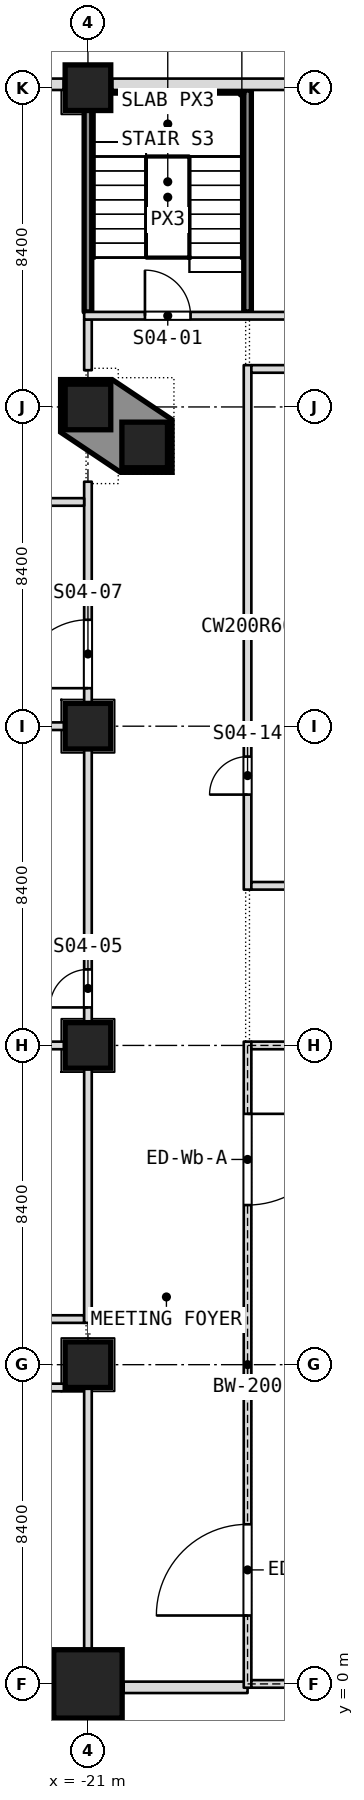
"""IFC4 building model, lengths in metres.
Left out: names, types, materials, properties, quantities, classifications, styles, units other than length and angle.
Written with IfcOpenShell. Run it as: python <this file> out.ifc"""

import sys

from ifc_helpers import new_model, si_unit, direction, frame, frame_2d, origin, origin_2d, place, context, subcontext, project, spatial, polyline, rectangle, outline, extrude, element, fill, save


model = new_model("IFC4")
c1 = context("Model", 3, precision=1e-05, world=origin(), true_north=direction((0.0, 1.0)))
c2 = subcontext(c1, "Body", "Model", "MODEL_VIEW")
j1 = project(units=[si_unit("LENGTHUNIT", "METRE"), si_unit("PLANEANGLEUNIT", "RADIAN")], contexts=[c1])
p1 = place(None, origin())
s1 = spatial("IfcSite", under=j1, at=p1, CompositionType="ELEMENT")
p2 = place(p1, origin())
s2 = spatial("IfcBuilding", under=s1, at=p2, CompositionType="ELEMENT")
p3 = place(p2, frame((0.0, 0.0, 21.0)))
s3 = spatial("IfcBuildingStorey", under=s2, at=p3, CompositionType="ELEMENT", Elevation=21.0)
p4 = place(p3, frame((-21.0, 0.0, 0.0), z_axis=(0.0, 0.0, 1.0), x_axis=(1.0, 0.0, 0.0)))
e1 = element("IfcColumn", 1, at=p4, inside=s3, PredefinedType="COLUMN", context=c2, shape_type="SweptSolid", body=[
    extrude(rectangle(XDim=1.8, YDim=1.8, at=origin_2d()), origin(), (0.0, 0.0, 1.0), 5.0),
])
for number, where, z_axis, x_axis in (
    (2, (-21.0, 8.4, 0.0), (0.0, 0.0, 1.0), (1.0, 0.0, 0.0)),
    (3, (-21.0, 16.8, 0.0), (0.0, 0.0, 1.0), (1.0, 0.0, 0.0)),
    (4, (-21.0, 25.2, 0.0), (0.0, 0.0, 1.0), (1.0, 0.0, 0.0)),
    (5, (-21.0, 33.6, 0.0), (0.0, 0.0, 1.0), (1.0, 0.0, 0.0)),
    (6, (-21.0, 42.0, 0.0), (0.0, 0.0, 1.0), (1.0, 0.0, 0.0)),
    (7, (-19.507, 32.6, 0.0), (0.0, 0.0, 1.0), (1.0, 0.0, 0.0)),
):
    element("IfcColumn", number, at=place(p3, frame(where, z_axis=z_axis, x_axis=x_axis)), inside=s3, PredefinedType="COLUMN", context=c2, shape_type="SweptSolid", body=[
        extrude(rectangle(XDim=1.2, YDim=1.2, at=origin_2d()), origin(), (0.0, 0.0, 1.0), 5.0),
    ])
p5 = place(p3, frame((-37.74, 7.8, 0.0), z_axis=(0.0, 0.0, 1.0), x_axis=(1.0, 0.0, 0.0)))
e8 = element("IfcWall", 8, at=p5, inside=s3, PredefinedType="PARTITIONING", context=c2, shape_type="SweptSolid", body=[
    extrude(rectangle(XDim=16.64, YDim=0.2, at=frame_2d((8.32, 0.0))), origin(), (0.0, 0.0, 1.0), 4.68),
])
p6 = place(p5, frame((6.14, 0.0, 0.0)))
e9 = element("IfcOpeningElement", 9, at=p6, cuts=e8, PredefinedType="OPENING", context=c2, shape_type="SweptSolid", body=[
    extrude(rectangle(XDim=1.8, YDim=2.1, at=frame_2d((0.9, 1.05))), frame((0.0, 0.1, 0.0), z_axis=(0.0, -1.0, 0.0), x_axis=(1.0, 0.0, 0.0)), (0.0, 0.0, 1.0), 0.2),
])
p7 = place(p3, frame((-27.5, 9.6, 0.0), z_axis=(0.0, 0.0, 1.0), x_axis=(1.0, 0.0, 0.0)))
e10 = element("IfcWall", 10, at=p7, inside=s3, PredefinedType="PARTITIONING", context=c2, shape_type="SweptSolid", body=[
    extrude(rectangle(XDim=6.4, YDim=0.2, at=frame_2d((3.2, 0.0))), origin(), (0.0, 0.0, 1.0), 4.68),
])
p8 = place(p3, frame((-16.8, 20.9, 0.0), z_axis=(0.0, 0.0, 1.0), x_axis=(0.0, 1.0, 0.0)))
e11 = element("IfcWall", 11, at=p8, inside=s3, PredefinedType="PARTITIONING", context=c2, shape_type="SweptSolid", body=[
    extrude(rectangle(XDim=13.8, YDim=0.2, at=frame_2d((6.9, 0.0))), origin(), (0.0, 0.0, 1.0), 4.68),
])
p9 = place(p8, frame((2.5, 0.0, 0.0)))
e12 = element("IfcOpeningElement", 12, at=p9, cuts=e11, PredefinedType="OPENING", context=c2, shape_type="SweptSolid", body=[
    extrude(rectangle(XDim=1.0, YDim=2.1, at=frame_2d((0.5, 1.05))), frame((0.0, 0.1, 0.0), z_axis=(0.0, -1.0, 0.0), x_axis=(1.0, 0.0, 0.0)), (0.0, 0.0, 1.0), 0.2),
])
p10 = place(p3, frame((-16.8, 36.1, 0.0), z_axis=(0.0, 0.0, 1.0), x_axis=(0.0, 1.0, 0.0)))
e13 = element("IfcWall", 13, at=p10, inside=s3, PredefinedType="PARTITIONING", context=c2, shape_type="SweptSolid", body=[
    extrude(rectangle(XDim=5.84, YDim=0.2, at=frame_2d((2.92, 0.0))), origin(), (0.0, 0.0, 1.0), 4.68),
])
p11 = place(p3, frame((-27.63, 16.8, 0.0), z_axis=(0.0, 0.0, 1.0), x_axis=(1.0, 0.0, 0.0)))
e14 = element("IfcWall", 14, at=p11, inside=s3, PredefinedType="PARTITIONING", context=c2, shape_type="SweptSolid", body=[
    extrude(rectangle(XDim=6.53, YDim=0.2, at=frame_2d((3.265, 0.0))), origin(), (0.0, 0.0, 1.0), 4.68),
])
p12 = place(p3, frame((-21.0, -0.3, 0.0), z_axis=(0.0, 0.0, 1.0), x_axis=(0.0, 1.0, 0.0)))
e15 = element("IfcWall", 15, at=p12, inside=s3, PredefinedType="PARTITIONING", context=c2, shape_type="SweptSolid", body=[
    extrude(rectangle(XDim=8.2, YDim=0.2, at=frame_2d((4.1, 0.0))), origin(), (0.0, 0.0, 1.0), 4.68),
])
p13 = place(p3, frame((-21.0, 9.5, 0.0), z_axis=(0.0, 0.0, 1.0), x_axis=(0.0, 1.0, 0.0)))
e16 = element("IfcWall", 16, at=p13, inside=s3, PredefinedType="PARTITIONING", context=c2, shape_type="SweptSolid", body=[
    extrude(rectangle(XDim=22.133, YDim=0.2, at=frame_2d((11.066, 0.0))), origin(), (0.0, 0.0, 1.0), 4.68),
])
p14 = place(p13, frame((8.3, 0.0, 0.0)))
e17 = element("IfcOpeningElement", 17, at=p14, cuts=e16, PredefinedType="OPENING", context=c2, shape_type="SweptSolid", body=[
    extrude(rectangle(XDim=1.0, YDim=2.1, at=frame_2d((0.5, 1.05))), frame((0.0, 0.1, 0.0), z_axis=(0.0, -1.0, 0.0), x_axis=(1.0, 0.0, 0.0)), (0.0, 0.0, 1.0), 0.2),
])
p15 = place(p13, frame((16.7, 0.0, 0.0)))
e18 = element("IfcOpeningElement", 18, at=p15, cuts=e16, PredefinedType="OPENING", context=c2, shape_type="SweptSolid", body=[
    extrude(rectangle(XDim=1.8, YDim=2.1, at=frame_2d((0.9, 1.05))), frame((0.0, 0.1, 0.0), z_axis=(0.0, -1.0, 0.0), x_axis=(1.0, 0.0, 0.0)), (0.0, 0.0, 1.0), 0.2),
])
p16 = place(p3, frame((-21.0, 34.567, 0.0), z_axis=(0.0, 0.0, 1.0), x_axis=(0.0, 1.0, 0.0)))
e19 = element("IfcWall", 19, at=p16, inside=s3, PredefinedType="PARTITIONING", context=c2, shape_type="SweptSolid", body=[
    extrude(rectangle(XDim=1.333, YDim=0.2, at=frame_2d((0.667, 0.0))), origin(), (0.0, 0.0, 1.0), 4.68),
])
p17 = place(p3, frame((-21.0, 36.1, 0.0), z_axis=(0.0, 0.0, 1.0), x_axis=(0.0, 1.0, 0.0)))
e20 = element("IfcWall", 20, at=p17, inside=s3, PredefinedType="PARTITIONING", context=c2, shape_type="SweptSolid", body=[
    extrude(rectangle(XDim=6.2, YDim=0.2, at=frame_2d((3.1, 0.0))), origin(), (0.0, 0.0, 1.0), 4.68),
])
p18 = place(p3, frame((-16.7, 21.0, 0.0), z_axis=(0.0, 0.0, 1.0), x_axis=(1.0, 0.0, 0.0)))
e21 = element("IfcWall", 21, at=p18, inside=s3, PredefinedType="PARTITIONING", context=c2, shape_type="SweptSolid", body=[
    extrude(rectangle(XDim=33.4, YDim=0.2, at=frame_2d((16.7, 0.0))), origin(), (0.0, 0.0, 1.0), 4.68),
])
p19 = place(p18, frame((15.8, 0.0, 0.0)))
e22 = element("IfcOpeningElement", 22, at=p19, cuts=e21, PredefinedType="OPENING", context=c2, shape_type="SweptSolid", body=[
    extrude(rectangle(XDim=1.8, YDim=2.1, at=frame_2d((0.9, 1.05))), frame((0.0, 0.1, 0.0), z_axis=(0.0, -1.0, 0.0), x_axis=(1.0, 0.0, 0.0)), (0.0, 0.0, 1.0), 0.2),
])
p20 = place(p3, frame((-27.68, 25.2, 0.0), z_axis=(0.0, 0.0, 1.0), x_axis=(1.0, 0.0, 0.0)))
e23 = element("IfcWall", 23, at=p20, inside=s3, PredefinedType="PARTITIONING", context=c2, shape_type="SweptSolid", body=[
    extrude(rectangle(XDim=6.58, YDim=0.2, at=frame_2d((3.29, 0.0))), origin(), (0.0, 0.0, 1.0), 4.68),
])
p21 = place(p3, frame((-25.916, 31.1, 0.0), z_axis=(0.0, 0.0, 1.0), x_axis=(1.0, 0.0, 0.0)))
e24 = element("IfcWall", 24, at=p21, inside=s3, PredefinedType="PARTITIONING", context=c2, shape_type="SweptSolid", body=[
    extrude(rectangle(XDim=4.816, YDim=0.2, at=frame_2d((2.408, 0.0))), origin(), (0.0, 0.0, 1.0), 4.68),
])
p22 = place(p3, frame((-16.7, 34.6, 0.0), z_axis=(0.0, 0.0, 1.0), x_axis=(1.0, 0.0, 0.0)))
e25 = element("IfcWall", 25, at=p22, inside=s3, PredefinedType="PARTITIONING", context=c2, shape_type="SweptSolid", body=[
    extrude(rectangle(XDim=3.33, YDim=0.2, at=frame_2d((1.665, 0.0))), origin(), (0.0, 0.0, 1.0), 4.68),
])
p23 = place(p3, frame((-21.1, 36.0, 0.0), z_axis=(0.0, 0.0, 1.0), x_axis=(1.0, 0.0, 0.0)))
e26 = element("IfcWall", 26, at=p23, inside=s3, PredefinedType="PARTITIONING", context=c2, shape_type="SweptSolid", body=[
    extrude(rectangle(XDim=23.3, YDim=0.2, at=frame_2d((11.65, 0.0))), origin(), (0.0, 0.0, 1.0), 4.68),
])
p24 = place(p23, frame((1.6, 0.0, 0.0)))
e27 = element("IfcOpeningElement", 27, at=p24, cuts=e26, PredefinedType="OPENING", context=c2, shape_type="SweptSolid", body=[
    extrude(rectangle(XDim=1.2, YDim=2.1, at=frame_2d((0.6, 1.05))), frame((0.0, 0.1, 0.0), z_axis=(0.0, -1.0, 0.0), x_axis=(1.0, 0.0, 0.0)), (0.0, 0.0, 1.0), 0.2),
])
p25 = place(p23, frame((6.0, 0.0, 0.0)))
e28 = element("IfcOpeningElement", 28, at=p25, cuts=e26, PredefinedType="OPENING", context=c2, shape_type="SweptSolid", body=[
    extrude(rectangle(XDim=1.0, YDim=2.1, at=frame_2d((0.5, 1.05))), frame((0.0, 0.1, 0.0), z_axis=(0.0, -1.0, 0.0), x_axis=(1.0, 0.0, 0.0)), (0.0, 0.0, 1.0), 0.2),
])
p26 = place(p23, frame((13.15, 0.0, 0.0)))
e29 = element("IfcOpeningElement", 29, at=p26, cuts=e26, PredefinedType="OPENING", context=c2, shape_type="SweptSolid", body=[
    extrude(rectangle(XDim=1.0, YDim=2.1, at=frame_2d((0.5, 1.05))), frame((0.0, 0.1, 0.0), z_axis=(0.0, -1.0, 0.0), x_axis=(1.0, 0.0, 0.0)), (0.0, 0.0, 1.0), 0.2),
])
p27 = place(p23, frame((20.5, 0.0, 0.0)))
e30 = element("IfcOpeningElement", 30, at=p27, cuts=e26, PredefinedType="OPENING", context=c2, shape_type="SweptSolid", body=[
    extrude(rectangle(XDim=1.2, YDim=2.1, at=frame_2d((0.6, 1.05))), frame((0.0, 0.1, 0.0), z_axis=(0.0, -1.0, 0.0), x_axis=(1.0, 0.0, 0.0)), (0.0, 0.0, 1.0), 0.2),
])
p28 = place(p3, frame((-26.423, -0.09, 0.0), z_axis=(0.0, 0.0, 1.0), x_axis=(1.0, 0.0, 0.0)))
e31 = element("IfcWall", 31, at=p28, inside=s3, PredefinedType="NOTDEFINED", context=c2, shape_type="SweptSolid", body=[
    extrude(rectangle(XDim=4.483, YDim=0.3, at=frame_2d((2.242, 0.0))), origin(), (0.0, 0.0, 1.0), 3.78),
])
p29 = place(p3, frame((-20.06, -0.09, 0.0), z_axis=(0.0, 0.0, 1.0), x_axis=(1.0, 0.0, 0.0)))
e32 = element("IfcWall", 32, at=p29, inside=s3, PredefinedType="NOTDEFINED", context=c2, shape_type="SweptSolid", body=[
    extrude(rectangle(XDim=3.26, YDim=0.3, at=frame_2d((1.63, 0.0))), origin(), (0.0, 0.0, 1.0), 5.0),
])
for number, where, z_axis, x_axis in (
    (33, (-13.24, 42.09, 0.0), (0.0, 0.0, 1.0), (-1.0, 0.0, 0.0)),
    (34, (-21.64, 42.09, 0.0), (0.0, 0.0, 1.0), (-1.0, 0.0, 0.0)),
):
    element("IfcWall", number, at=place(p3, frame(where, z_axis=z_axis, x_axis=x_axis)), inside=s3, PredefinedType="NOTDEFINED", context=c2, shape_type="SweptSolid", body=[
        extrude(rectangle(XDim=7.12, YDim=0.3, at=frame_2d((3.56, 0.0))), origin(), (0.0, 0.0, 1.0), 3.78),
    ])
p30 = place(p3, frame((-16.8, -0.1, 0.0), z_axis=(0.0, 0.0, 1.0), x_axis=(0.0, 1.0, 0.0)))
e35 = element("IfcWall", 35, at=p30, inside=s3, PredefinedType="PARTITIONING", context=c2, shape_type="SweptSolid", body=[
    extrude(rectangle(XDim=17.0, YDim=0.2, at=frame_2d((8.5, 0.0))), origin(), (0.0, 0.0, 1.0), 4.78),
])
p31 = place(p30, frame((1.9, 0.0, 0.0)))
e36 = element("IfcOpeningElement", 36, at=p31, cuts=e35, PredefinedType="OPENING", context=c2, shape_type="SweptSolid", body=[
    extrude(rectangle(XDim=2.4, YDim=2.1, at=frame_2d((1.2, 1.05))), frame((0.0, 0.1, 0.0), z_axis=(0.0, -1.0, 0.0), x_axis=(1.0, 0.0, 0.0)), (0.0, 0.0, 1.0), 0.2),
])
p32 = place(p30, frame((12.7, 0.0, 0.0)))
e37 = element("IfcOpeningElement", 37, at=p32, cuts=e35, PredefinedType="OPENING", context=c2, shape_type="SweptSolid", body=[
    extrude(rectangle(XDim=2.4, YDim=2.1, at=frame_2d((1.2, 1.05))), frame((0.0, 0.1, 0.0), z_axis=(0.0, -1.0, 0.0), x_axis=(1.0, 0.0, 0.0)), (0.0, 0.0, 1.0), 0.2),
])
for number, where, z_axis, x_axis in (
    (38, (-16.7, 0.0, 0.0), (0.0, 0.0, 1.0), (1.0, 0.0, 0.0)),
    (39, (-16.7, 16.8, 0.0), (0.0, 0.0, 1.0), (1.0, 0.0, 0.0)),
):
    element("IfcWall", number, at=place(p3, frame(where, z_axis=z_axis, x_axis=x_axis)), inside=s3, PredefinedType="PARTITIONING", context=c2, shape_type="SweptSolid", body=[
        extrude(rectangle(XDim=4.1, YDim=0.2, at=frame_2d((2.05, 0.0))), origin(), (0.0, 0.0, 1.0), 4.78),
    ])
p33 = place(p3, origin())
e40 = element("IfcWall", 40, at=p33, inside=s3, PredefinedType="SOLIDWALL", context=c2, shape_type="SweptSolid", body=[
    extrude(outline(polyline([(-21.72, 34.32), (-20.364, 34.32), (-18.787, 33.264), (-18.787, 31.88), (-20.143, 31.88), (-21.72, 32.936), (-21.72, 34.32)]), holes=[polyline([(-18.907, 32.0), (-18.907, 33.2), (-20.107, 33.2), (-20.107, 32.0), (-18.907, 32.0)]), polyline([(-20.4, 33.0), (-20.4, 34.2), (-21.6, 34.2), (-21.6, 33.0), (-20.4, 33.0)])]), origin(), (0.0, 0.0, 1.0), 5.0),
])
p34 = place(p24, origin())
e41 = element("IfcDoor", 41, at=p34, inside=s3, OperationType="SINGLE_SWING_RIGHT", PredefinedType="DOOR", context=c2, shape_type="SweptSolid", body=[
    extrude(rectangle(XDim=1.2, YDim=2.1, at=frame_2d((0.6, 1.05))), frame((0.0, 0.025, 0.0), z_axis=(0.0, -1.0, 0.0), x_axis=(1.0, 0.0, 0.0)), (0.0, 0.0, 1.0), 0.05),
])
fill(e27, e41)
p35 = place(p14, origin())
e42 = element("IfcDoor", 42, at=p35, inside=s3, OperationType="SINGLE_SWING_RIGHT", PredefinedType="DOOR", context=c2, shape_type="SweptSolid", body=[
    extrude(rectangle(XDim=1.0, YDim=2.1, at=frame_2d((0.5, 1.05))), frame((0.0, 0.025, 0.0), z_axis=(0.0, -1.0, 0.0), x_axis=(1.0, 0.0, 0.0)), (0.0, 0.0, 1.0), 0.05),
])
fill(e17, e42)
p36 = place(p15, origin())
e43 = element("IfcDoor", 43, at=p36, inside=s3, OperationType="DOUBLE_DOOR_SINGLE_SWING", PredefinedType="DOOR", context=c2, shape_type="SweptSolid", body=[
    extrude(rectangle(XDim=1.8, YDim=2.1, at=frame_2d((0.9, 1.05))), frame((0.0, 0.025, 0.0), z_axis=(0.0, -1.0, 0.0), x_axis=(1.0, 0.0, 0.0)), (0.0, 0.0, 1.0), 0.05),
])
fill(e18, e43)
p37 = place(p9, origin())
e44 = element("IfcDoor", 44, at=p37, inside=s3, OperationType="SINGLE_SWING_LEFT", PredefinedType="DOOR", context=c2, shape_type="SweptSolid", body=[
    extrude(rectangle(XDim=1.0, YDim=2.1, at=frame_2d((0.5, 1.05))), frame((0.0, 0.025, 0.0), z_axis=(0.0, -1.0, 0.0), x_axis=(1.0, 0.0, 0.0)), (0.0, 0.0, 1.0), 0.05),
])
fill(e12, e44)
p38 = place(p31, origin())
e45 = element("IfcDoor", 45, at=p38, inside=s3, OperationType="DOUBLE_DOOR_SINGLE_SWING", PredefinedType="DOOR", context=c2, shape_type="SweptSolid", body=[
    extrude(rectangle(XDim=2.4, YDim=2.1, at=frame_2d((1.2, 1.05))), frame((0.0, 0.025, 0.0), z_axis=(0.0, -1.0, 0.0), x_axis=(1.0, 0.0, 0.0)), (0.0, 0.0, 1.0), 0.05),
])
fill(e36, e45)
p39 = place(p32, origin())
e46 = element("IfcDoor", 46, at=p39, inside=s3, OperationType="DOUBLE_DOOR_SINGLE_SWING", PredefinedType="DOOR", context=c2, shape_type="SweptSolid", body=[
    extrude(rectangle(XDim=2.4, YDim=2.1, at=frame_2d((1.2, 1.05))), frame((0.0, 0.025, 0.0), z_axis=(0.0, -1.0, 0.0), x_axis=(1.0, 0.0, 0.0)), (0.0, 0.0, 1.0), 0.05),
])
fill(e37, e46)
save(model, sys.argv[1])
